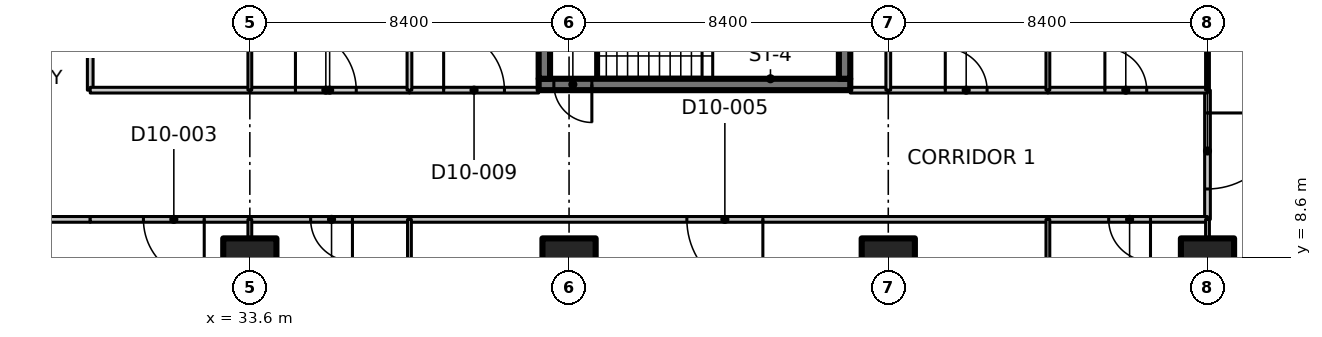
"""IFC4 building model, lengths in metres.
Left out: names, types, materials, properties, quantities, classifications, styles, units other than length and angle.
Written with IfcOpenShell. Run it as: python <this file> out.ifc"""

import sys

from ifc_helpers import new_model, si_unit, direction, frame, frame_2d, origin, origin_2d, place, context, subcontext, project, spatial, polyline, rectangle, outline, extrude, element, fill, save


model = new_model("IFC4")
c1 = context("Model", 3, precision=1e-05, world=origin(), true_north=direction((0.0, 1.0)))
c2 = subcontext(c1, "Body", "Model", "MODEL_VIEW")
j1 = project(units=[si_unit("LENGTHUNIT", "METRE"), si_unit("PLANEANGLEUNIT", "RADIAN")], contexts=[c1])
p1 = place(None, origin())
s1 = spatial("IfcSite", under=j1, at=p1, CompositionType="ELEMENT")
p2 = place(p1, origin())
s2 = spatial("IfcBuilding", under=s1, at=p2, CompositionType="ELEMENT")
p3 = place(p2, frame((0.0, 0.0, 68.9)))
s3 = spatial("IfcBuildingStorey", under=s2, at=p3, CompositionType="ELEMENT", Elevation=68.9)
for number, where, z_axis, x_axis in (
    (1, (33.6, 8.4, 0.0), (0.0, 0.0, 1.0), (1.0, 0.0, 0.0)),
    (2, (42.0, 8.4, 0.0), (0.0, 0.0, 1.0), (1.0, 0.0, 0.0)),
    (3, (50.4, 8.4, 0.0), (0.0, 0.0, 1.0), (1.0, 0.0, 0.0)),
    (4, (58.8, 8.4, 0.0), (0.0, 0.0, 1.0), (1.0, 0.0, 0.0)),
):
    element("IfcColumn", number, at=place(p3, frame(where, z_axis=z_axis, x_axis=x_axis)), inside=s3, PredefinedType="COLUMN", context=c2, shape_type="SweptSolid", body=[
        extrude(rectangle(XDim=1.4, YDim=1.4, at=origin_2d()), origin(), (0.0, 0.0, 1.0), 3.35),
    ])
p4 = place(p3, frame((49.4, 13.15, 0.0), z_axis=(0.0, 0.0, 1.0), x_axis=(-1.0, 0.0, 0.0)))
e5 = element("IfcWall", 5, at=p4, inside=s3, PredefinedType="SHEAR", context=c2, shape_type="SweptSolid", body=[
    extrude(rectangle(XDim=8.2, YDim=0.3, at=frame_2d((4.1, 0.0))), origin(), (0.0, 0.0, 1.0), 3.35),
])
p5 = place(p4, frame((6.8, 0.0, 0.0)))
e6 = element("IfcOpeningElement", 6, at=p5, cuts=e5, PredefinedType="OPENING", context=c2, shape_type="SweptSolid", body=[
    extrude(rectangle(XDim=1.0, YDim=2.1, at=frame_2d((0.5, 1.05))), frame((0.0, 0.16, 0.0), z_axis=(0.0, -1.0, 0.0), x_axis=(1.0, 0.0, 0.0)), (0.0, 0.0, 1.0), 0.32),
])
for number, where, z_axis, x_axis in (
    (7, (41.35, 13.3, 0.0), (0.0, 0.0, 1.0), (0.0, 1.0, 0.0)),
    (8, (49.25, 13.3, 0.0), (0.0, 0.0, 1.0), (0.0, 1.0, 0.0)),
):
    element("IfcWall", number, at=place(p3, frame(where, z_axis=z_axis, x_axis=x_axis)), inside=s3, PredefinedType="SHEAR", context=c2, shape_type="SweptSolid", body=[
        extrude(rectangle(XDim=2.55, YDim=0.3, at=frame_2d((1.275, 0.0))), origin(), (0.0, 0.0, 1.0), 3.35),
    ])
p6 = place(p3, frame((29.4, 9.6, 0.0), z_axis=(0.0, 0.0, 1.0), x_axis=(-1.0, 0.0, 0.0)))
e9 = element("IfcWall", 9, at=p6, inside=s3, PredefinedType="PARTITIONING", context=c2, shape_type="SweptSolid", body=[
    extrude(rectangle(XDim=4.2, YDim=0.15, at=frame_2d((2.1, 0.0))), origin(), (0.0, 0.0, 1.0), 3.33),
])
p7 = place(p3, frame((29.4, 21.2, 0.0), z_axis=(0.0, 0.0, 1.0), x_axis=(0.0, -1.0, 0.0)))
e10 = element("IfcWall", 10, at=p7, inside=s3, PredefinedType="PARTITIONING", context=c2, shape_type="SweptSolid", body=[
    extrude(rectangle(XDim=8.2, YDim=0.15, at=frame_2d((4.1, 0.0))), origin(), (0.0, 0.0, 1.0), 3.33),
])
p8 = place(p7, frame((3.3, 0.0, 0.0)))
e11 = element("IfcOpeningElement", 11, at=p8, cuts=e10, PredefinedType="OPENING", context=c2, shape_type="SweptSolid", body=[
    extrude(rectangle(XDim=1.6, YDim=2.1, at=frame_2d((0.8, 1.05))), frame((0.0, 0.085, 0.0), z_axis=(0.0, -1.0, 0.0), x_axis=(1.0, 0.0, 0.0)), (0.0, 0.0, 1.0), 0.17),
])
p9 = place(p3, frame((58.8, 13.0, 0.0), z_axis=(0.0, 0.0, 1.0), x_axis=(0.0, -1.0, 0.0)))
e12 = element("IfcWall", 12, at=p9, inside=s3, PredefinedType="PARTITIONING", context=c2, shape_type="SweptSolid", body=[
    extrude(rectangle(XDim=3.4, YDim=0.15, at=frame_2d((1.7, 0.0))), origin(), (0.0, 0.0, 1.0), 3.33),
])
p10 = place(p9, frame((0.6, 0.0, 0.0)))
e13 = element("IfcOpeningElement", 13, at=p10, cuts=e12, PredefinedType="OPENING", context=c2, shape_type="SweptSolid", body=[
    extrude(rectangle(XDim=2.0, YDim=2.4, at=frame_2d((1.0, 1.2))), frame((0.0, 0.085, 0.0), z_axis=(0.0, -1.0, 0.0), x_axis=(1.0, 0.0, 0.0)), (0.0, 0.0, 1.0), 0.17),
])
p11 = place(p3, frame((33.6, 9.6, 0.0), z_axis=(0.0, 0.0, 1.0), x_axis=(-1.0, 0.0, 0.0)))
e14 = element("IfcWall", 14, at=p11, inside=s3, PredefinedType="PARTITIONING", context=c2, shape_type="SweptSolid", body=[
    extrude(rectangle(XDim=4.2, YDim=0.15, at=frame_2d((2.1, 0.0))), origin(), (0.0, 0.0, 1.0), 3.33),
])
p12 = place(p11, frame((1.2, 0.0, 0.0)))
e15 = element("IfcOpeningElement", 15, at=p12, cuts=e14, PredefinedType="OPENING", context=c2, shape_type="SweptSolid", body=[
    extrude(rectangle(XDim=1.6, YDim=2.1, at=frame_2d((0.8, 1.05))), frame((0.0, 0.085, 0.0), z_axis=(0.0, -1.0, 0.0), x_axis=(1.0, 0.0, 0.0)), (0.0, 0.0, 1.0), 0.17),
])
p13 = place(p3, frame((37.8, 9.6, 0.0), z_axis=(0.0, 0.0, 1.0), x_axis=(-1.0, 0.0, 0.0)))
e16 = element("IfcWall", 16, at=p13, inside=s3, PredefinedType="PARTITIONING", context=c2, shape_type="SweptSolid", body=[
    extrude(rectangle(XDim=4.2, YDim=0.15, at=frame_2d((2.1, 0.0))), origin(), (0.0, 0.0, 1.0), 3.33),
])
p14 = place(p13, frame((1.5, 0.0, 0.0)))
e17 = element("IfcOpeningElement", 17, at=p14, cuts=e16, PredefinedType="OPENING", context=c2, shape_type="SweptSolid", body=[
    extrude(rectangle(XDim=1.1, YDim=2.1, at=frame_2d((0.55, 1.05))), frame((0.0, 0.085, 0.0), z_axis=(0.0, -1.0, 0.0), x_axis=(1.0, 0.0, 0.0)), (0.0, 0.0, 1.0), 0.17),
])
p15 = place(p3, frame((54.6, 9.6, 0.0), z_axis=(0.0, 0.0, 1.0), x_axis=(-1.0, 0.0, 0.0)))
e18 = element("IfcWall", 18, at=p15, inside=s3, PredefinedType="PARTITIONING", context=c2, shape_type="SweptSolid", body=[
    extrude(rectangle(XDim=16.8, YDim=0.15, at=frame_2d((8.4, 0.0))), origin(), (0.0, 0.0, 1.0), 3.33),
])
p16 = place(p15, frame((7.5, 0.0, 0.0)))
e19 = element("IfcOpeningElement", 19, at=p16, cuts=e18, PredefinedType="OPENING", context=c2, shape_type="SweptSolid", body=[
    extrude(rectangle(XDim=2.0, YDim=2.4, at=frame_2d((1.0, 1.2))), frame((0.0, 0.085, 0.0), z_axis=(0.0, -1.0, 0.0), x_axis=(1.0, 0.0, 0.0)), (0.0, 0.0, 1.0), 0.17),
])
p17 = place(p3, frame((58.8, 9.6, 0.0), z_axis=(0.0, 0.0, 1.0), x_axis=(-1.0, 0.0, 0.0)))
e20 = element("IfcWall", 20, at=p17, inside=s3, PredefinedType="PARTITIONING", context=c2, shape_type="SweptSolid", body=[
    extrude(rectangle(XDim=4.2, YDim=0.15, at=frame_2d((2.1, 0.0))), origin(), (0.0, 0.0, 1.0), 3.33),
])
p18 = place(p17, frame((1.5, 0.0, 0.0)))
e21 = element("IfcOpeningElement", 21, at=p18, cuts=e20, PredefinedType="OPENING", context=c2, shape_type="SweptSolid", body=[
    extrude(rectangle(XDim=1.1, YDim=2.1, at=frame_2d((0.55, 1.05))), frame((0.0, 0.085, 0.0), z_axis=(0.0, -1.0, 0.0), x_axis=(1.0, 0.0, 0.0)), (0.0, 0.0, 1.0), 0.17),
])
p19 = place(p3, frame((29.4, 13.0, 0.0), z_axis=(0.0, 0.0, 1.0), x_axis=(1.0, 0.0, 0.0)))
e22 = element("IfcWall", 22, at=p19, inside=s3, PredefinedType="PARTITIONING", context=c2, shape_type="SweptSolid", body=[
    extrude(rectangle(XDim=4.2, YDim=0.15, at=frame_2d((2.1, 0.0))), origin(), (0.0, 0.0, 1.0), 3.33),
])
p20 = place(p3, frame((33.6, 13.0, 0.0), z_axis=(0.0, 0.0, 1.0), x_axis=(1.0, 0.0, 0.0)))
e23 = element("IfcWall", 23, at=p20, inside=s3, PredefinedType="PARTITIONING", context=c2, shape_type="SweptSolid", body=[
    extrude(rectangle(XDim=4.2, YDim=0.15, at=frame_2d((2.1, 0.0))), origin(), (0.0, 0.0, 1.0), 3.33),
])
p21 = place(p20, frame((1.2, 0.0, 0.0)))
e24 = element("IfcOpeningElement", 24, at=p21, cuts=e23, PredefinedType="OPENING", context=c2, shape_type="SweptSolid", body=[
    extrude(rectangle(XDim=1.6, YDim=2.1, at=frame_2d((0.8, 1.05))), frame((0.0, 0.085, 0.0), z_axis=(0.0, -1.0, 0.0), x_axis=(1.0, 0.0, 0.0)), (0.0, 0.0, 1.0), 0.17),
])
p22 = place(p3, frame((37.8, 13.0, 0.0), z_axis=(0.0, 0.0, 1.0), x_axis=(1.0, 0.0, 0.0)))
e25 = element("IfcWall", 25, at=p22, inside=s3, PredefinedType="PARTITIONING", context=c2, shape_type="SweptSolid", body=[
    extrude(rectangle(XDim=3.4, YDim=0.15, at=frame_2d((1.7, 0.0))), origin(), (0.0, 0.0, 1.0), 3.33),
])
p23 = place(p22, frame((0.9, 0.0, 0.0)))
e26 = element("IfcOpeningElement", 26, at=p23, cuts=e25, PredefinedType="OPENING", context=c2, shape_type="SweptSolid", body=[
    extrude(rectangle(XDim=1.6, YDim=2.1, at=frame_2d((0.8, 1.05))), frame((0.0, 0.085, 0.0), z_axis=(0.0, -1.0, 0.0), x_axis=(1.0, 0.0, 0.0)), (0.0, 0.0, 1.0), 0.17),
])
p24 = place(p3, frame((49.4, 13.0, 0.0), z_axis=(0.0, 0.0, 1.0), x_axis=(1.0, 0.0, 0.0)))
e27 = element("IfcWall", 27, at=p24, inside=s3, PredefinedType="PARTITIONING", context=c2, shape_type="SweptSolid", body=[
    extrude(rectangle(XDim=1.0, YDim=0.15, at=frame_2d((0.5, 0.0))), origin(), (0.0, 0.0, 1.0), 3.33),
])
p25 = place(p3, frame((50.4, 13.0, 0.0), z_axis=(0.0, 0.0, 1.0), x_axis=(1.0, 0.0, 0.0)))
e28 = element("IfcWall", 28, at=p25, inside=s3, PredefinedType="PARTITIONING", context=c2, shape_type="SweptSolid", body=[
    extrude(rectangle(XDim=4.2, YDim=0.15, at=frame_2d((2.1, 0.0))), origin(), (0.0, 0.0, 1.0), 3.33),
])
p26 = place(p25, frame((1.5, 0.0, 0.0)))
e29 = element("IfcOpeningElement", 29, at=p26, cuts=e28, PredefinedType="OPENING", context=c2, shape_type="SweptSolid", body=[
    extrude(rectangle(XDim=1.1, YDim=2.1, at=frame_2d((0.55, 1.05))), frame((0.0, 0.085, 0.0), z_axis=(0.0, -1.0, 0.0), x_axis=(1.0, 0.0, 0.0)), (0.0, 0.0, 1.0), 0.17),
])
p27 = place(p3, frame((54.6, 13.0, 0.0), z_axis=(0.0, 0.0, 1.0), x_axis=(1.0, 0.0, 0.0)))
e30 = element("IfcWall", 30, at=p27, inside=s3, PredefinedType="PARTITIONING", context=c2, shape_type="SweptSolid", body=[
    extrude(rectangle(XDim=4.2, YDim=0.15, at=frame_2d((2.1, 0.0))), origin(), (0.0, 0.0, 1.0), 3.33),
])
p28 = place(p27, frame((1.5, 0.0, 0.0)))
e31 = element("IfcOpeningElement", 31, at=p28, cuts=e30, PredefinedType="OPENING", context=c2, shape_type="SweptSolid", body=[
    extrude(rectangle(XDim=1.1, YDim=2.1, at=frame_2d((0.55, 1.05))), frame((0.0, 0.085, 0.0), z_axis=(0.0, -1.0, 0.0), x_axis=(1.0, 0.0, 0.0)), (0.0, 0.0, 1.0), 0.17),
])
p29 = place(p3, frame((58.8, 9.12, 0.0), z_axis=(0.0, 0.0, 1.0), x_axis=(0.0, 1.0, 0.0)))
e32 = element("IfcWall", 32, at=p29, inside=s3, PredefinedType="PARTITIONING", context=c2, shape_type="SweptSolid", body=[
    extrude(rectangle(XDim=0.48, YDim=0.1, at=frame_2d((0.24, 0.0))), origin(), (0.0, 0.0, 1.0), 3.33),
])
p30 = place(p3, frame((58.8, 13.0, 0.0), z_axis=(0.0, 0.0, 1.0), x_axis=(0.0, 1.0, 0.0)))
e33 = element("IfcWall", 33, at=p30, inside=s3, PredefinedType="PARTITIONING", context=c2, shape_type="SweptSolid", body=[
    extrude(rectangle(XDim=3.08, YDim=0.1, at=frame_2d((1.54, 0.0))), origin(), (0.0, 0.0, 1.0), 3.33),
])
p31 = place(p3, frame((33.6, 9.6, 0.0), z_axis=(0.0, 0.0, 1.0), x_axis=(0.0, -1.0, 0.0)))
e34 = element("IfcWall", 34, at=p31, inside=s3, PredefinedType="PARTITIONING", context=c2, shape_type="SweptSolid", body=[
    extrude(rectangle(XDim=0.48, YDim=0.1, at=frame_2d((0.24, 0.0))), origin(), (0.0, 0.0, 1.0), 3.33),
])
for number, where, z_axis, x_axis in (
    (35, (37.8, 9.6, 0.0), (0.0, 0.0, 1.0), (0.0, -1.0, 0.0)),
    (36, (54.6, 9.6, 0.0), (0.0, 0.0, 1.0), (0.0, -1.0, 0.0)),
):
    element("IfcWall", number, at=place(p3, frame(where, z_axis=z_axis, x_axis=x_axis)), inside=s3, PredefinedType="PARTITIONING", context=c2, shape_type="SweptSolid", body=[
        extrude(outline(polyline([(0.0, 0.0), (10.774, 0.0), (10.774, 3.33), (10.7, 3.33), (10.05, 3.33), (10.048, 2.98), (9.152, 2.98), (9.15, 3.33), (0.0, 3.33), (0.0, 0.0)])), frame((0.0, 0.05, 0.0), z_axis=(0.0, -1.0, 0.0), x_axis=(1.0, 0.0, 0.0)), (0.0, 0.0, 1.0), 0.1),
    ])
p32 = place(p3, frame((33.6, 16.08, 0.0), z_axis=(0.0, 0.0, 1.0), x_axis=(0.0, -1.0, 0.0)))
e37 = element("IfcWall", 37, at=p32, inside=s3, PredefinedType="PARTITIONING", context=c2, shape_type="SweptSolid", body=[
    extrude(rectangle(XDim=3.08, YDim=0.1, at=frame_2d((1.54, 0.0))), origin(), (0.0, 0.0, 1.0), 3.33),
])
p33 = place(p3, frame((37.8, 30.526, 0.0), z_axis=(0.0, 0.0, 1.0), x_axis=(0.0, -1.0, 0.0)))
e38 = element("IfcWall", 38, at=p33, inside=s3, PredefinedType="PARTITIONING", context=c2, shape_type="SweptSolid", body=[
    extrude(outline(polyline([(0.0, 0.0), (17.526, 0.0), (17.526, 3.33), (5.776, 3.33), (5.774, 2.98), (4.878, 2.98), (4.876, 3.33), (0.283, 3.33), (0.0, 3.33), (0.0, 0.0)])), frame((0.0, 0.062, 0.0), z_axis=(0.0, -1.0, 0.0), x_axis=(1.0, 0.0, 0.0)), (0.0, 0.0, 1.0), 0.125),
])
p34 = place(p3, frame((50.4, 16.08, 0.0), z_axis=(0.0, 0.0, 1.0), x_axis=(0.0, -1.0, 0.0)))
e39 = element("IfcWall", 39, at=p34, inside=s3, PredefinedType="PARTITIONING", context=c2, shape_type="SweptSolid", body=[
    extrude(rectangle(XDim=3.08, YDim=0.125, at=frame_2d((1.54, 0.0))), origin(), (0.0, 0.0, 1.0), 3.33),
])
p35 = place(p3, frame((54.6, 26.565, 0.0), z_axis=(0.0, 0.0, 1.0), x_axis=(0.0, -1.0, 0.0)))
e40 = element("IfcWall", 40, at=p35, inside=s3, PredefinedType="PARTITIONING", context=c2, shape_type="SweptSolid", body=[
    extrude(outline(polyline([(0.0, 0.0), (13.565, 0.0), (13.565, 3.33), (1.815, 3.33), (1.813, 2.98), (0.917, 2.98), (0.915, 3.33), (0.265, 3.33), (0.0, 3.33), (0.0, 0.0)])), frame((0.0, 0.05, 0.0), z_axis=(0.0, -1.0, 0.0), x_axis=(1.0, 0.0, 0.0)), (0.0, 0.0, 1.0), 0.1),
])
p36 = place(p5, origin())
e41 = element("IfcDoor", 41, at=p36, inside=s3, OperationType="SINGLE_SWING_LEFT", PredefinedType="DOOR", context=c2, shape_type="SweptSolid", body=[
    extrude(rectangle(XDim=1.0, YDim=2.1, at=frame_2d((0.5, 1.05))), frame((0.0, 0.025, 0.0), z_axis=(0.0, -1.0, 0.0), x_axis=(1.0, 0.0, 0.0)), (0.0, 0.0, 1.0), 0.05),
])
fill(e6, e41)
p37 = place(p10, origin())
e42 = element("IfcDoor", 42, at=p37, inside=s3, OperationType="DOUBLE_DOOR_SINGLE_SWING", PredefinedType="DOOR", context=c2, shape_type="SweptSolid", body=[
    extrude(rectangle(XDim=2.0, YDim=2.4, at=frame_2d((1.0, 1.2))), frame((0.0, 0.025, 0.0), z_axis=(0.0, -1.0, 0.0), x_axis=(1.0, 0.0, 0.0)), (0.0, 0.0, 1.0), 0.05),
])
fill(e13, e42)
p38 = place(p12, origin())
e43 = element("IfcDoor", 43, at=p38, inside=s3, OperationType="DOUBLE_DOOR_SINGLE_SWING", PredefinedType="DOOR", context=c2, shape_type="SweptSolid", body=[
    extrude(rectangle(XDim=1.6, YDim=2.1, at=frame_2d((0.8, 1.05))), frame((0.0, 0.025, 0.0), z_axis=(0.0, -1.0, 0.0), x_axis=(1.0, 0.0, 0.0)), (0.0, 0.0, 1.0), 0.05),
])
fill(e15, e43)
p39 = place(p14, origin())
e44 = element("IfcDoor", 44, at=p39, inside=s3, OperationType="SINGLE_SWING_LEFT", PredefinedType="DOOR", context=c2, shape_type="SweptSolid", body=[
    extrude(rectangle(XDim=1.1, YDim=2.1, at=frame_2d((0.55, 1.05))), frame((0.0, 0.025, 0.0), z_axis=(0.0, -1.0, 0.0), x_axis=(1.0, 0.0, 0.0)), (0.0, 0.0, 1.0), 0.05),
])
fill(e17, e44)
p40 = place(p16, origin())
e45 = element("IfcDoor", 45, at=p40, inside=s3, OperationType="DOUBLE_DOOR_SINGLE_SWING", PredefinedType="DOOR", context=c2, shape_type="SweptSolid", body=[
    extrude(rectangle(XDim=2.0, YDim=2.4, at=frame_2d((1.0, 1.2))), frame((0.0, 0.025, 0.0), z_axis=(0.0, -1.0, 0.0), x_axis=(1.0, 0.0, 0.0)), (0.0, 0.0, 1.0), 0.05),
])
fill(e19, e45)
p41 = place(p18, origin())
e46 = element("IfcDoor", 46, at=p41, inside=s3, OperationType="SINGLE_SWING_LEFT", PredefinedType="DOOR", context=c2, shape_type="SweptSolid", body=[
    extrude(rectangle(XDim=1.1, YDim=2.1, at=frame_2d((0.55, 1.05))), frame((0.0, 0.025, 0.0), z_axis=(0.0, -1.0, 0.0), x_axis=(1.0, 0.0, 0.0)), (0.0, 0.0, 1.0), 0.05),
])
fill(e21, e46)
p42 = place(p21, origin())
e47 = element("IfcDoor", 47, at=p42, inside=s3, OperationType="DOUBLE_DOOR_SINGLE_SWING", PredefinedType="DOOR", context=c2, shape_type="SweptSolid", body=[
    extrude(rectangle(XDim=1.6, YDim=2.1, at=frame_2d((0.8, 1.05))), frame((0.0, 0.025, 0.0), z_axis=(0.0, -1.0, 0.0), x_axis=(1.0, 0.0, 0.0)), (0.0, 0.0, 1.0), 0.05),
])
fill(e24, e47)
p43 = place(p23, origin())
e48 = element("IfcDoor", 48, at=p43, inside=s3, OperationType="DOUBLE_DOOR_SINGLE_SWING", PredefinedType="DOOR", context=c2, shape_type="SweptSolid", body=[
    extrude(rectangle(XDim=1.6, YDim=2.1, at=frame_2d((0.8, 1.05))), frame((0.0, 0.025, 0.0), z_axis=(0.0, -1.0, 0.0), x_axis=(1.0, 0.0, 0.0)), (0.0, 0.0, 1.0), 0.05),
])
fill(e26, e48)
p44 = place(p26, origin())
e49 = element("IfcDoor", 49, at=p44, inside=s3, OperationType="SINGLE_SWING_LEFT", PredefinedType="DOOR", context=c2, shape_type="SweptSolid", body=[
    extrude(rectangle(XDim=1.1, YDim=2.1, at=frame_2d((0.55, 1.05))), frame((0.0, 0.025, 0.0), z_axis=(0.0, -1.0, 0.0), x_axis=(1.0, 0.0, 0.0)), (0.0, 0.0, 1.0), 0.05),
])
fill(e29, e49)
p45 = place(p28, origin())
e50 = element("IfcDoor", 50, at=p45, inside=s3, OperationType="SINGLE_SWING_LEFT", PredefinedType="DOOR", context=c2, shape_type="SweptSolid", body=[
    extrude(rectangle(XDim=1.1, YDim=2.1, at=frame_2d((0.55, 1.05))), frame((0.0, 0.025, 0.0), z_axis=(0.0, -1.0, 0.0), x_axis=(1.0, 0.0, 0.0)), (0.0, 0.0, 1.0), 0.05),
])
fill(e31, e50)
save(model, sys.argv[1])
